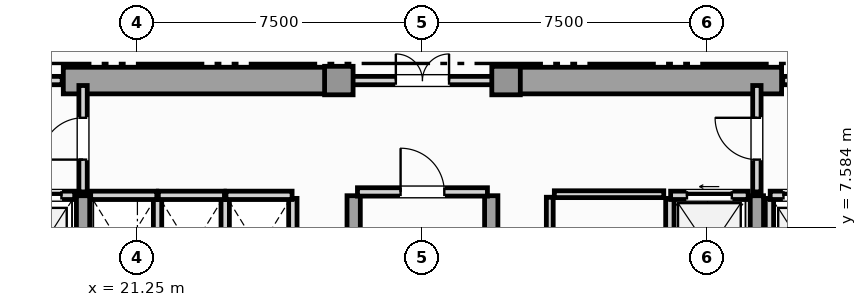
"""IFC4 building model, lengths in metres.
Left out: names, types, materials, properties, quantities, classifications, styles, units other than length and angle.
Written with IfcOpenShell. Run it as: python <this file> out.ifc"""

import sys

from ifc_helpers import new_model, si_unit, direction, frame, frame_2d, origin, origin_2d, place, context, subcontext, project, spatial, rectangle, extrude, element, fill, save


model = new_model("IFC4")
c1 = context("Model", 3, precision=1e-05, world=origin(), true_north=direction((0.0, 1.0)))
c2 = subcontext(c1, "Body", "Model", "MODEL_VIEW")
j1 = project(units=[si_unit("LENGTHUNIT", "METRE"), si_unit("PLANEANGLEUNIT", "RADIAN")], contexts=[c1])
p1 = place(None, origin())
s1 = spatial("IfcSite", under=j1, at=p1, CompositionType="ELEMENT")
p2 = place(p1, origin())
s2 = spatial("IfcBuilding", under=s1, at=p2, CompositionType="ELEMENT")
p3 = place(p2, frame((0.0, 0.0, 76.0)))
s3 = spatial("IfcBuildingStorey", under=s2, at=p3, CompositionType="ELEMENT", Elevation=76.0)
for number, where, z_axis, x_axis in (
    (1, (19.3, 11.45, 0.0), (0.0, 0.0, 1.0), (1.0, 0.0, 0.0)),
    (2, (30.9, 11.45, 0.0), (0.0, 0.0, 1.0), (1.0, 0.0, 0.0)),
):
    element("IfcWall", number, at=place(p3, frame(where, z_axis=z_axis, x_axis=x_axis)), inside=s3, PredefinedType="SHEAR", context=c2, shape_type="SweptSolid", body=[
        extrude(rectangle(XDim=7.3, YDim=0.7, at=frame_2d((3.65, 0.0))), origin(), (0.0, 0.0, 1.0), 4.8),
    ])
for number, where, z_axis, x_axis in (
    (3, (19.82, 0.92, 0.0), (0.0, 0.0, 1.0), (0.0, 1.0, 0.0)),
    (4, (26.94, 0.92, 0.0), (0.0, 0.0, 1.0), (0.0, 1.0, 0.0)),
    (5, (30.56, 0.92, 0.0), (0.0, 0.0, 1.0), (0.0, 1.0, 0.0)),
    (6, (37.55, 0.92, 0.0), (0.0, 0.0, 1.0), (0.0, 1.0, 0.0)),
):
    element("IfcWall", number, at=place(p3, frame(where, z_axis=z_axis, x_axis=x_axis)), inside=s3, PredefinedType="SHEAR", context=c2, shape_type="SweptSolid", body=[
        extrude(rectangle(XDim=7.5, YDim=0.35, at=frame_2d((3.75, 0.0))), origin(), (0.0, 0.0, 1.0), 4.8),
    ])
for number, where, z_axis, x_axis in (
    (7, (26.55, 11.45, 0.0), (0.0, 0.0, 1.0), (1.0, 0.0, 0.0)),
    (8, (30.95, 11.45, 0.0), (0.0, 0.0, 1.0), (1.0, 0.0, 0.0)),
):
    element("IfcColumn", number, at=place(p3, frame(where, z_axis=z_axis, x_axis=x_axis)), inside=s3, PredefinedType="COLUMN", context=c2, shape_type="SweptSolid", body=[
        extrude(rectangle(XDim=0.75, YDim=0.75, at=origin_2d()), origin(), (0.0, 0.0, 1.0), 5.05),
    ])
p4 = place(p3, frame((17.78, 8.43, 0.0), z_axis=(0.0, 0.0, 1.0), x_axis=(1.0, 0.0, 0.0)))
e9 = element("IfcWall", 9, at=p4, inside=s3, PredefinedType="SOLIDWALL", context=c2, shape_type="SweptSolid", body=[
    extrude(rectangle(XDim=1.82, YDim=0.22, at=frame_2d((0.91, 0.0))), origin(), (0.0, 0.0, 1.0), 4.8),
])
p5 = place(p4, frame((0.35, 0.0, 0.0)))
e10 = element("IfcOpeningElement", 10, at=p5, cuts=e9, PredefinedType="OPENING", context=c2, shape_type="SweptSolid", body=[
    extrude(rectangle(XDim=1.12, YDim=2.25, at=frame_2d((0.56, 1.125))), frame((0.0, 0.12, 0.0), z_axis=(0.0, -1.0, 0.0), x_axis=(1.0, 0.0, 0.0)), (0.0, 0.0, 1.0), 0.24),
])
p6 = place(p3, frame((37.88, 5.65, 0.0), z_axis=(0.0, 0.0, 1.0), x_axis=(0.0, 1.0, 0.0)))
e11 = element("IfcWall", 11, at=p6, inside=s3, PredefinedType="SOLIDWALL", context=c2, shape_type="SweptSolid", body=[
    extrude(rectangle(XDim=2.7, YDim=0.22, at=frame_2d((1.35, 0.0))), origin(), (0.0, 0.0, 1.0), 4.8),
])
p7 = place(p3, frame((37.9, 8.43, 0.0), z_axis=(0.0, 0.0, 1.0), x_axis=(1.0, 0.0, 0.0)))
e12 = element("IfcWall", 12, at=p7, inside=s3, PredefinedType="SOLIDWALL", context=c2, shape_type="SweptSolid", body=[
    extrude(rectangle(XDim=1.82, YDim=0.22, at=frame_2d((0.91, 0.0))), origin(), (0.0, 0.0, 1.0), 4.8),
])
p8 = place(p7, frame((0.35, 0.0, 0.0)))
e13 = element("IfcOpeningElement", 13, at=p8, cuts=e12, PredefinedType="OPENING", context=c2, shape_type="SweptSolid", body=[
    extrude(rectangle(XDim=1.12, YDim=2.25, at=frame_2d((0.56, 1.125))), frame((0.0, 0.12, 0.0), z_axis=(0.0, -1.0, 0.0), x_axis=(1.0, 0.0, 0.0)), (0.0, 0.0, 1.0), 0.24),
])
p9 = place(p3, frame((35.26, 5.65, 0.0), z_axis=(0.0, 0.0, 1.0), x_axis=(0.0, 1.0, 0.0)))
e14 = element("IfcWall", 14, at=p9, inside=s3, PredefinedType="SOLIDWALL", context=c2, shape_type="SweptSolid", body=[
    extrude(rectangle(XDim=2.7, YDim=0.22, at=frame_2d((1.35, 0.0))), origin(), (0.0, 0.0, 1.0), 4.8),
])
p10 = place(p3, frame((35.28, 8.43, 0.0), z_axis=(0.0, 0.0, 1.0), x_axis=(1.0, 0.0, 0.0)))
e15 = element("IfcWall", 15, at=p10, inside=s3, PredefinedType="SOLIDWALL", context=c2, shape_type="SweptSolid", body=[
    extrude(rectangle(XDim=2.04, YDim=0.22, at=frame_2d((1.02, 0.0))), origin(), (0.0, 0.0, 1.0), 4.8),
])
p11 = place(p10, frame((0.43, 0.0, 0.0)))
e16 = element("IfcOpeningElement", 16, at=p11, cuts=e15, PredefinedType="OPENING", context=c2, shape_type="SweptSolid", body=[
    extrude(rectangle(XDim=1.18, YDim=2.2, at=frame_2d((0.59, 1.1))), frame((0.0, 0.12, 0.0), z_axis=(0.0, -1.0, 0.0), x_axis=(1.0, 0.0, 0.0)), (0.0, 0.0, 1.0), 0.24),
])
p12 = place(p3, frame((21.78, 5.65, 0.0), z_axis=(0.0, 0.0, 1.0), x_axis=(0.0, 1.0, 0.0)))
e17 = element("IfcWall", 17, at=p12, inside=s3, PredefinedType="SOLIDWALL", context=c2, shape_type="SweptSolid", body=[
    extrude(rectangle(XDim=2.7, YDim=0.22, at=frame_2d((1.35, 0.0))), origin(), (0.0, 0.0, 1.0), 4.8),
])
p13 = place(p3, frame((20.02, 8.43, 0.0), z_axis=(0.0, 0.0, 1.0), x_axis=(1.0, 0.0, 0.0)))
e18 = element("IfcWall", 18, at=p13, inside=s3, PredefinedType="SOLIDWALL", context=c2, shape_type="SweptSolid", body=[
    extrude(rectangle(XDim=1.74, YDim=0.22, at=frame_2d((0.87, 0.0))), origin(), (0.0, 0.0, 1.0), 4.8),
])
p14 = place(p3, frame((23.56, 5.65, 0.0), z_axis=(0.0, 0.0, 1.0), x_axis=(0.0, 1.0, 0.0)))
e19 = element("IfcWall", 19, at=p14, inside=s3, PredefinedType="SOLIDWALL", context=c2, shape_type="SweptSolid", body=[
    extrude(rectangle(XDim=2.7, YDim=0.22, at=frame_2d((1.35, 0.0))), origin(), (0.0, 0.0, 1.0), 4.8),
])
p15 = place(p3, frame((21.8, 8.43, 0.0), z_axis=(0.0, 0.0, 1.0), x_axis=(1.0, 0.0, 0.0)))
e20 = element("IfcWall", 20, at=p15, inside=s3, PredefinedType="SOLIDWALL", context=c2, shape_type="SweptSolid", body=[
    extrude(rectangle(XDim=1.74, YDim=0.22, at=frame_2d((0.87, 0.0))), origin(), (0.0, 0.0, 1.0), 4.8),
])
p16 = place(p3, frame((25.34, 5.65, 0.0), z_axis=(0.0, 0.0, 1.0), x_axis=(0.0, 1.0, 0.0)))
e21 = element("IfcWall", 21, at=p16, inside=s3, PredefinedType="SOLIDWALL", context=c2, shape_type="SweptSolid", body=[
    extrude(rectangle(XDim=2.7, YDim=0.22, at=frame_2d((1.35, 0.0))), origin(), (0.0, 0.0, 1.0), 4.8),
])
p17 = place(p3, frame((23.58, 8.43, 0.0), z_axis=(0.0, 0.0, 1.0), x_axis=(1.0, 0.0, 0.0)))
e22 = element("IfcWall", 22, at=p17, inside=s3, PredefinedType="SOLIDWALL", context=c2, shape_type="SweptSolid", body=[
    extrude(rectangle(XDim=1.74, YDim=0.22, at=frame_2d((0.87, 0.0))), origin(), (0.0, 0.0, 1.0), 4.8),
])
p18 = place(p3, frame((27.04, 8.52, 0.0), z_axis=(0.0, 0.0, 1.0), x_axis=(1.0, 0.0, 0.0)))
e23 = element("IfcWall", 23, at=p18, inside=s3, PredefinedType="SOLIDWALL", context=c2, shape_type="SweptSolid", body=[
    extrude(rectangle(XDim=3.42, YDim=0.22, at=frame_2d((1.71, 0.0))), origin(), (0.0, 0.0, 1.0), 4.8),
])
p19 = place(p18, frame((1.135, 0.0, 0.0)))
e24 = element("IfcOpeningElement", 24, at=p19, cuts=e23, PredefinedType="OPENING", context=c2, shape_type="SweptSolid", body=[
    extrude(rectangle(XDim=1.15, YDim=2.2, at=frame_2d((0.575, 1.1))), frame((0.0, 0.12, 0.0), z_axis=(0.0, -1.0, 0.0), x_axis=(1.0, 0.0, 0.0)), (0.0, 0.0, 1.0), 0.24),
])
p20 = place(p3, frame((19.82, 8.52, 0.0), z_axis=(0.0, 0.0, 1.0), x_axis=(0.0, 1.0, 0.0)))
e25 = element("IfcWall", 25, at=p20, inside=s3, PredefinedType="SOLIDWALL", context=c2, shape_type="SweptSolid", body=[
    extrude(rectangle(XDim=2.8, YDim=0.22, at=frame_2d((1.4, 0.0))), origin(), (0.0, 0.0, 1.0), 4.256),
])
p21 = place(p20, frame((0.85, 0.0, 0.0)))
e26 = element("IfcOpeningElement", 26, at=p21, cuts=e25, PredefinedType="OPENING", context=c2, shape_type="SweptSolid", body=[
    extrude(rectangle(XDim=1.1, YDim=2.2, at=frame_2d((0.55, 1.1))), frame((0.0, 0.12, 0.0), z_axis=(0.0, -1.0, 0.0), x_axis=(1.0, 0.0, 0.0)), (0.0, 0.0, 1.0), 0.24),
])
p22 = place(p3, frame((37.55, 8.52, 0.0), z_axis=(0.0, 0.0, 1.0), x_axis=(0.0, 1.0, 0.0)))
e27 = element("IfcWall", 27, at=p22, inside=s3, PredefinedType="SOLIDWALL", context=c2, shape_type="SweptSolid", body=[
    extrude(rectangle(XDim=2.8, YDim=0.22, at=frame_2d((1.4, 0.0))), origin(), (0.0, 0.0, 1.0), 4.256),
])
p23 = place(p22, frame((0.85, 0.0, 0.0)))
e28 = element("IfcOpeningElement", 28, at=p23, cuts=e27, PredefinedType="OPENING", context=c2, shape_type="SweptSolid", body=[
    extrude(rectangle(XDim=1.1, YDim=2.2, at=frame_2d((0.55, 1.1))), frame((0.0, 0.12, 0.0), z_axis=(0.0, -1.0, 0.0), x_axis=(1.0, 0.0, 0.0)), (0.0, 0.0, 1.0), 0.24),
])
p24 = place(p3, frame((16.23, 11.45, 0.0), z_axis=(0.0, 0.0, 1.0), x_axis=(1.0, 0.0, 0.0)))
e29 = element("IfcWall", 29, at=p24, inside=s3, PredefinedType="SOLIDWALL", context=c2, shape_type="SweptSolid", body=[
    extrude(rectangle(XDim=3.04, YDim=0.22, at=frame_2d((1.52, 0.0))), origin(), (0.0, 0.0, 1.0), 4.8),
])
p25 = place(p24, frame((0.97, 0.0, 0.0)))
e30 = element("IfcOpeningElement", 30, at=p25, cuts=e29, PredefinedType="OPENING", context=c2, shape_type="SweptSolid", body=[
    extrude(rectangle(XDim=1.1, YDim=2.2, at=frame_2d((0.55, 1.1))), frame((0.0, 0.12, 0.0), z_axis=(0.0, -1.0, 0.0), x_axis=(1.0, 0.0, 0.0)), (0.0, 0.0, 1.0), 0.24),
])
p26 = place(p3, frame((26.63, 11.45, 0.0), z_axis=(0.0, 0.0, 1.0), x_axis=(1.0, 0.0, 0.0)))
e31 = element("IfcWall", 31, at=p26, inside=s3, PredefinedType="SOLIDWALL", context=c2, shape_type="SweptSolid", body=[
    extrude(rectangle(XDim=4.24, YDim=0.22, at=frame_2d((2.12, 0.0))), origin(), (0.0, 0.0, 1.0), 4.8),
])
p27 = place(p26, frame((1.42, 0.0, 0.0)))
e32 = element("IfcOpeningElement", 32, at=p27, cuts=e31, PredefinedType="OPENING", context=c2, shape_type="SweptSolid", body=[
    extrude(rectangle(XDim=1.4, YDim=2.2, at=frame_2d((0.7, 1.1))), frame((0.0, 0.12, 0.0), z_axis=(0.0, -1.0, 0.0), x_axis=(1.0, 0.0, 0.0)), (0.0, 0.0, 1.0), 0.24),
])
p28 = place(p3, frame((38.23, 11.45, 0.0), z_axis=(0.0, 0.0, 1.0), x_axis=(1.0, 0.0, 0.0)))
e33 = element("IfcWall", 33, at=p28, inside=s3, PredefinedType="SOLIDWALL", context=c2, shape_type="SweptSolid", body=[
    extrude(rectangle(XDim=3.04, YDim=0.22, at=frame_2d((1.52, 0.0))), origin(), (0.0, 0.0, 1.0), 4.8),
])
p29 = place(p28, frame((0.97, 0.0, 0.0)))
e34 = element("IfcOpeningElement", 34, at=p29, cuts=e33, PredefinedType="OPENING", context=c2, shape_type="SweptSolid", body=[
    extrude(rectangle(XDim=1.1, YDim=2.2, at=frame_2d((0.55, 1.1))), frame((0.0, 0.12, 0.0), z_axis=(0.0, -1.0, 0.0), x_axis=(1.0, 0.0, 0.0)), (0.0, 0.0, 1.0), 0.24),
])
p30 = place(p3, frame((32.1, 5.65, 0.0), z_axis=(0.0, 0.0, 1.0), x_axis=(0.0, 1.0, 0.0)))
e35 = element("IfcWall", 35, at=p30, inside=s3, PredefinedType="PARTITIONING", context=c2, shape_type="SweptSolid", body=[
    extrude(rectangle(XDim=2.73, YDim=0.18, at=frame_2d((1.365, 0.0))), origin(), (0.0, 0.0, 1.0), 4.8),
])
p31 = place(p30, frame((0.925, 0.0, 0.0)))
e36 = element("IfcOpeningElement", 36, at=p31, cuts=e35, PredefinedType="OPENING", context=c2, shape_type="SweptSolid", body=[
    extrude(rectangle(XDim=0.88, YDim=2.05, at=frame_2d((0.44, 1.025))), frame((0.0, 0.1, 0.0), z_axis=(0.0, -1.0, 0.0), x_axis=(1.0, 0.0, 0.0)), (0.0, 0.0, 1.0), 0.2),
])
p32 = place(p3, frame((32.22, 8.46, 0.0), z_axis=(0.0, 0.0, 1.0), x_axis=(1.0, 0.0, 0.0)))
e37 = element("IfcWall", 37, at=p32, inside=s3, PredefinedType="PARTITIONING", context=c2, shape_type="SweptSolid", body=[
    extrude(rectangle(XDim=2.88, YDim=0.18, at=frame_2d((1.44, 0.0))), origin(), (0.0, 0.0, 1.0), 4.8),
])
p33 = place(p5, origin())
e38 = element("IfcDoor", 38, at=p33, inside=s3, OperationType="SLIDING_TO_LEFT", PredefinedType="DOOR", context=c2, shape_type="SweptSolid", body=[
    extrude(rectangle(XDim=1.12, YDim=2.25, at=frame_2d((0.56, 1.125))), frame((0.0, 0.025, 0.0), z_axis=(0.0, -1.0, 0.0), x_axis=(1.0, 0.0, 0.0)), (0.0, 0.0, 1.0), 0.05),
])
fill(e10, e38)
p34 = place(p8, origin())
e39 = element("IfcDoor", 39, at=p34, inside=s3, OperationType="SLIDING_TO_RIGHT", PredefinedType="DOOR", context=c2, shape_type="SweptSolid", body=[
    extrude(rectangle(XDim=1.12, YDim=2.25, at=frame_2d((0.56, 1.125))), frame((0.0, 0.025, 0.0), z_axis=(0.0, -1.0, 0.0), x_axis=(1.0, 0.0, 0.0)), (0.0, 0.0, 1.0), 0.05),
])
fill(e13, e39)
p35 = place(p11, origin())
e40 = element("IfcDoor", 40, at=p35, inside=s3, OperationType="SLIDING_TO_LEFT", PredefinedType="DOOR", context=c2, shape_type="SweptSolid", body=[
    extrude(rectangle(XDim=1.18, YDim=2.2, at=frame_2d((0.59, 1.1))), frame((0.0, 0.025, 0.0), z_axis=(0.0, -1.0, 0.0), x_axis=(1.0, 0.0, 0.0)), (0.0, 0.0, 1.0), 0.05),
])
fill(e16, e40)
p36 = place(p19, origin())
e41 = element("IfcDoor", 41, at=p36, inside=s3, OperationType="SINGLE_SWING_LEFT", PredefinedType="DOOR", context=c2, shape_type="SweptSolid", body=[
    extrude(rectangle(XDim=1.15, YDim=2.2, at=frame_2d((0.575, 1.1))), frame((0.0, 0.025, 0.0), z_axis=(0.0, -1.0, 0.0), x_axis=(1.0, 0.0, 0.0)), (0.0, 0.0, 1.0), 0.05),
])
fill(e24, e41)
p37 = place(p21, origin())
e42 = element("IfcDoor", 42, at=p37, inside=s3, OperationType="SINGLE_SWING_LEFT", PredefinedType="DOOR", context=c2, shape_type="SweptSolid", body=[
    extrude(rectangle(XDim=1.1, YDim=2.2, at=frame_2d((0.55, 1.1))), frame((0.0, 0.025, 0.0), z_axis=(0.0, -1.0, 0.0), x_axis=(1.0, 0.0, 0.0)), (0.0, 0.0, 1.0), 0.05),
])
fill(e26, e42)
p38 = place(p23, origin())
e43 = element("IfcDoor", 43, at=p38, inside=s3, OperationType="SINGLE_SWING_RIGHT", PredefinedType="DOOR", context=c2, shape_type="SweptSolid", body=[
    extrude(rectangle(XDim=1.1, YDim=2.2, at=frame_2d((0.55, 1.1))), frame((0.0, 0.025, 0.0), z_axis=(0.0, -1.0, 0.0), x_axis=(1.0, 0.0, 0.0)), (0.0, 0.0, 1.0), 0.05),
])
fill(e28, e43)
p39 = place(p27, origin())
e44 = element("IfcDoor", 44, at=p39, inside=s3, OperationType="DOUBLE_DOOR_SINGLE_SWING", PredefinedType="DOOR", context=c2, shape_type="SweptSolid", body=[
    extrude(rectangle(XDim=1.4, YDim=2.2, at=frame_2d((0.7, 1.1))), frame((0.0, 0.025, 0.0), z_axis=(0.0, -1.0, 0.0), x_axis=(1.0, 0.0, 0.0)), (0.0, 0.0, 1.0), 0.05),
])
fill(e32, e44)
save(model, sys.argv[1])
